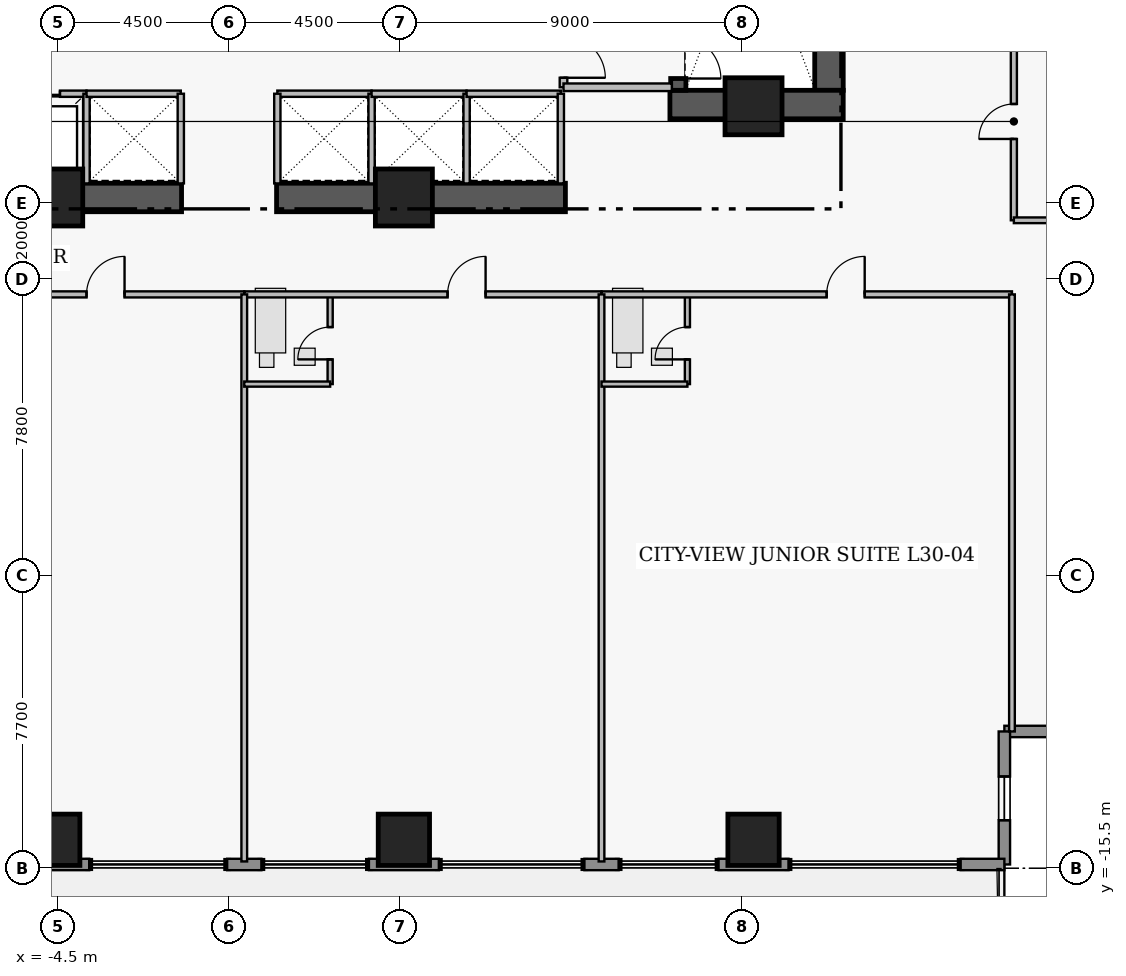
"""IFC4 building model, lengths in metres.
Left out: names, types, materials, properties, quantities, classifications, styles, units other than length and angle.
Written with IfcOpenShell. Run it as: python <this file> out.ifc"""

import sys

from ifc_helpers import new_model, si_unit, direction, frame, frame_2d, origin, origin_2d, place, context, subcontext, project, spatial, rectangle, extrude, element, fill, save


model = new_model("IFC4")
c1 = context("Model", 3, precision=1e-05, world=origin(), true_north=direction((0.0, 1.0)))
c2 = subcontext(c1, "Body", "Model", "MODEL_VIEW")
j1 = project(units=[si_unit("LENGTHUNIT", "METRE"), si_unit("PLANEANGLEUNIT", "RADIAN")], contexts=[c1])
p1 = place(None, origin())
s1 = spatial("IfcSite", under=j1, at=p1, CompositionType="ELEMENT")
p2 = place(p1, origin())
s2 = spatial("IfcBuilding", under=s1, at=p2, CompositionType="ELEMENT")
p3 = place(p2, frame((0.0, 0.0, 121.2)))
s3 = spatial("IfcBuildingStorey", under=s2, at=p3, CompositionType="ELEMENT", Elevation=121.2)
p4 = place(p3, frame((15.785, 4.97, 0.0), z_axis=(0.0, 0.0, 1.0), x_axis=(0.0, 1.0, 0.0)))
e1 = element("IfcWall", 1, at=p4, inside=s3, PredefinedType="SHEAR", context=c2, shape_type="SweptSolid", body=[
    extrude(rectangle(XDim=8.96, YDim=0.75, at=frame_2d((4.48, 0.0))), origin(), (0.0, 0.0, 1.0), 3.46),
])
p5 = place(p3, frame((11.6, 4.595, 0.0), z_axis=(0.0, 0.0, 1.0), x_axis=(1.0, 0.0, 0.0)))
e2 = element("IfcWall", 2, at=p5, inside=s3, PredefinedType="SHEAR", context=c2, shape_type="SweptSolid", body=[
    extrude(rectangle(XDim=4.56, YDim=0.75, at=frame_2d((2.28, 0.0))), origin(), (0.0, 0.0, 1.0), 3.46),
])
for number, where, z_axis, x_axis in (
    (3, (-8.85, 2.15, 0.0), (0.0, 0.0, 1.0), (1.0, 0.0, 0.0)),
    (4, (1.25, 2.15, 0.0), (0.0, 0.0, 1.0), (1.0, 0.0, 0.0)),
):
    element("IfcWall", number, at=place(p3, frame(where, z_axis=z_axis, x_axis=x_axis)), inside=s3, PredefinedType="SHEAR", context=c2, shape_type="SweptSolid", body=[
        extrude(rectangle(XDim=7.6, YDim=0.75, at=frame_2d((3.8, 0.0))), origin(), (0.0, 0.0, 1.0), 3.43),
    ])
p6 = place(p3, frame((11.82, 13.93, 0.0), z_axis=(0.0, 0.0, 1.0), x_axis=(0.0, -1.0, 0.0)))
e5 = element("IfcWall", 5, at=p6, inside=s3, PredefinedType="SHEAR", context=c2, shape_type="SweptSolid", body=[
    extrude(rectangle(XDim=8.96, YDim=0.4, at=frame_2d((4.48, 0.0))), origin(), (0.0, 0.0, 1.0), 3.46),
])
p7 = place(p6, frame((7.53, 0.0, 0.0)))
e6 = element("IfcOpeningElement", 6, at=p7, cuts=e5, PredefinedType="OPENING", context=c2, shape_type="SweptSolid", body=[
    extrude(rectangle(XDim=1.12, YDim=2.22, at=frame_2d((0.56, 1.11))), frame((0.0, 0.21, 0.0), z_axis=(0.0, -1.0, 0.0), x_axis=(1.0, 0.0, 0.0)), (0.0, 0.0, 1.0), 0.42),
])
for number, where, z_axis, x_axis in (
    (7, (-4.6, 2.15, 0.0), (0.0, 0.0, 1.0), (1.0, 0.0, 0.0)),
    (8, (4.6, 2.15, 0.0), (0.0, 0.0, 1.0), (1.0, 0.0, 0.0)),
    (9, (13.8, 4.55, 0.0), (0.0, 0.0, 1.0), (1.0, 0.0, 0.0)),
):
    element("IfcColumn", number, at=place(p3, frame(where, z_axis=z_axis, x_axis=x_axis)), inside=s3, PredefinedType="COLUMN", context=c2, shape_type="SweptSolid", body=[
        extrude(rectangle(XDim=1.5, YDim=1.5, at=origin_2d()), origin(), (0.0, 0.0, 1.0), 3.65),
    ])
for number, where, z_axis, x_axis in (
    (10, (-4.6, -14.75, 0.0), (0.0, 0.0, 1.0), (1.0, 0.0, 0.0)),
    (11, (4.6, -14.75, 0.0), (0.0, 0.0, 1.0), (1.0, 0.0, 0.0)),
    (12, (13.8, -14.75, 0.0), (0.0, 0.0, 1.0), (1.0, 0.0, 0.0)),
):
    element("IfcColumn", number, at=place(p3, frame(where, z_axis=z_axis, x_axis=x_axis)), inside=s3, PredefinedType="COLUMN", context=c2, shape_type="SweptSolid", body=[
        extrude(rectangle(XDim=1.35, YDim=1.35, at=origin_2d()), origin(), (0.0, 0.0, 1.0), 3.65),
    ])
p8 = place(p3, frame((23.9, -11.9, 0.0), z_axis=(0.0, 0.0, 1.0), x_axis=(-1.0, 0.0, 0.0)))
e13 = element("IfcWall", 13, at=p8, inside=s3, PredefinedType="STANDARD", context=c2, shape_type="SweptSolid", body=[
    extrude(rectangle(XDim=3.5, YDim=0.3, at=frame_2d((1.75, 0.0))), origin(), (0.0, 0.0, 1.0), 3.43),
])
p9 = place(p8, frame((1.065, 0.0, 1.25)))
e14 = element("IfcOpeningElement", 14, at=p9, cuts=e13, PredefinedType="OPENING", context=c2, shape_type="SweptSolid", body=[
    extrude(rectangle(XDim=1.15, YDim=1.55, at=frame_2d((0.575, 0.775))), frame((0.0, 0.16, 0.0), z_axis=(0.0, -1.0, 0.0), x_axis=(1.0, 0.0, 0.0)), (0.0, 0.0, 1.0), 0.32),
])
p10 = place(p3, frame((20.4, -11.9, 0.0), z_axis=(0.0, 0.0, 1.0), x_axis=(0.0, -1.0, 0.0)))
e15 = element("IfcWall", 15, at=p10, inside=s3, PredefinedType="STANDARD", context=c2, shape_type="SweptSolid", body=[
    extrude(rectangle(XDim=3.5, YDim=0.3, at=frame_2d((1.75, 0.0))), origin(), (0.0, 0.0, 1.0), 3.43),
])
p11 = place(p10, frame((1.185, 0.0, 1.25)))
e16 = element("IfcOpeningElement", 16, at=p11, cuts=e15, PredefinedType="OPENING", context=c2, shape_type="SweptSolid", body=[
    extrude(rectangle(XDim=1.15, YDim=1.55, at=frame_2d((0.575, 0.775))), frame((0.0, 0.16, 0.0), z_axis=(0.0, -1.0, 0.0), x_axis=(1.0, 0.0, 0.0)), (0.0, 0.0, 1.0), 0.32),
])
p12 = place(p3, frame((20.4, -15.4, 0.0), z_axis=(0.0, 0.0, 1.0), x_axis=(-1.0, 0.0, 0.0)))
e17 = element("IfcWall", 17, at=p12, inside=s3, PredefinedType="STANDARD", context=c2, shape_type="SweptSolid", body=[
    extrude(rectangle(XDim=1.15, YDim=0.3, at=frame_2d((0.575, 0.0))), origin(), (0.0, 0.0, 1.0), 3.43),
])
p13 = place(p3, frame((14.72, -15.4, 0.0), z_axis=(0.0, 0.0, 1.0), x_axis=(-1.0, 0.0, 0.0)))
e18 = element("IfcWall", 18, at=p13, inside=s3, PredefinedType="STANDARD", context=c2, shape_type="SweptSolid", body=[
    extrude(rectangle(XDim=1.84, YDim=0.3, at=frame_2d((0.92, 0.0))), origin(), (0.0, 0.0, 1.0), 3.43),
])
p14 = place(p3, frame((10.25, -15.4, 0.0), z_axis=(0.0, 0.0, 1.0), x_axis=(-1.0, 0.0, 0.0)))
e19 = element("IfcWall", 19, at=p14, inside=s3, PredefinedType="STANDARD", context=c2, shape_type="SweptSolid", body=[
    extrude(rectangle(XDim=0.9, YDim=0.3, at=frame_2d((0.45, 0.0))), origin(), (0.0, 0.0, 1.0), 3.43),
])
p15 = place(p3, frame((5.52, -15.4, 0.0), z_axis=(0.0, 0.0, 1.0), x_axis=(-1.0, 0.0, 0.0)))
e20 = element("IfcWall", 20, at=p15, inside=s3, PredefinedType="STANDARD", context=c2, shape_type="SweptSolid", body=[
    extrude(rectangle(XDim=1.84, YDim=0.3, at=frame_2d((0.92, 0.0))), origin(), (0.0, 0.0, 1.0), 3.43),
])
p16 = place(p3, frame((0.85, -15.4, 0.0), z_axis=(0.0, 0.0, 1.0), x_axis=(-1.0, 0.0, 0.0)))
e21 = element("IfcWall", 21, at=p16, inside=s3, PredefinedType="STANDARD", context=c2, shape_type="SweptSolid", body=[
    extrude(rectangle(XDim=0.9, YDim=0.3, at=frame_2d((0.45, 0.0))), origin(), (0.0, 0.0, 1.0), 3.43),
])
p17 = place(p3, frame((-3.68, -15.4, 0.0), z_axis=(0.0, 0.0, 1.0), x_axis=(-1.0, 0.0, 0.0)))
e22 = element("IfcWall", 22, at=p17, inside=s3, PredefinedType="STANDARD", context=c2, shape_type="SweptSolid", body=[
    extrude(rectangle(XDim=1.84, YDim=0.3, at=frame_2d((0.92, 0.0))), origin(), (0.0, 0.0, 1.0), 3.43),
])
p18 = place(p3, frame((8.8, 11.15, 0.0), z_axis=(0.0, 0.0, 1.0), x_axis=(0.0, -1.0, 0.0)))
e23 = element("IfcWall", 23, at=p18, inside=s3, PredefinedType="PARTITIONING", context=c2, shape_type="SweptSolid", body=[
    extrude(rectangle(XDim=6.1, YDim=0.2, at=frame_2d((3.05, 0.0))), origin(), (0.0, 0.0, 1.0), 3.43),
])
p19 = place(p18, frame((1.15, 0.0, 0.0)))
e24 = element("IfcOpeningElement", 24, at=p19, cuts=e23, PredefinedType="OPENING", context=c2, shape_type="SweptSolid", body=[
    extrude(rectangle(XDim=1.1, YDim=2.2, at=frame_2d((0.55, 1.1))), frame((0.0, 0.11, 0.0), z_axis=(0.0, -1.0, 0.0), x_axis=(1.0, 0.0, 0.0)), (0.0, 0.0, 1.0), 0.22),
])
p20 = place(p18, frame((4.75, 0.0, 0.0)))
e25 = element("IfcOpeningElement", 25, at=p20, cuts=e23, PredefinedType="OPENING", context=c2, shape_type="SweptSolid", body=[
    extrude(rectangle(XDim=1.1, YDim=2.2, at=frame_2d((0.55, 1.1))), frame((0.0, 0.11, 0.0), z_axis=(0.0, -1.0, 0.0), x_axis=(1.0, 0.0, 0.0)), (0.0, 0.0, 1.0), 0.22),
])
p21 = place(p3, frame((-6.25, 4.88, 0.0), z_axis=(0.0, 0.0, 1.0), x_axis=(1.0, 0.0, 0.0)))
e26 = element("IfcWall", 26, at=p21, inside=s3, PredefinedType="PARTITIONING", context=c2, shape_type="SweptSolid", body=[
    extrude(rectangle(XDim=2.5, YDim=0.165, at=frame_2d((1.25, 0.0))), origin(), (0.0, 0.0, 1.0), 3.43),
])
p22 = place(p21, frame((0.7, 0.0, 0.0)))
e27 = element("IfcOpeningElement", 27, at=p22, cuts=e26, PredefinedType="OPENING", context=c2, shape_type="SweptSolid", body=[
    extrude(rectangle(XDim=1.1, YDim=2.25, at=frame_2d((0.55, 1.125))), frame((0.0, 0.093, 0.0), z_axis=(0.0, -1.0, 0.0), x_axis=(1.0, 0.0, 0.0)), (0.0, 0.0, 1.0), 0.185),
])
p23 = place(p3, frame((-9.2, -0.4, 0.0), z_axis=(0.0, 0.0, 1.0), x_axis=(1.0, 0.0, 0.0)))
e28 = element("IfcWall", 28, at=p23, inside=s3, PredefinedType="PARTITIONING", context=c2, shape_type="SweptSolid", body=[
    extrude(rectangle(XDim=9.6, YDim=0.16, at=frame_2d((4.8, 0.0))), origin(), (0.0, 0.0, 1.0), 3.43),
])
p24 = place(p23, frame((5.45, 0.0, 0.0)))
e29 = element("IfcOpeningElement", 29, at=p24, cuts=e28, PredefinedType="OPENING", context=c2, shape_type="SweptSolid", body=[
    extrude(rectangle(XDim=1.0, YDim=2.15, at=frame_2d((0.5, 1.075))), frame((0.0, 0.09, 0.0), z_axis=(0.0, -1.0, 0.0), x_axis=(1.0, 0.0, 0.0)), (0.0, 0.0, 1.0), 0.18),
])
p25 = place(p3, frame((2.66, -2.76, 0.0), z_axis=(0.0, 0.0, 1.0), x_axis=(0.0, 1.0, 0.0)))
e30 = element("IfcWall", 30, at=p25, inside=s3, PredefinedType="PLUMBINGWALL", context=c2, shape_type="SweptSolid", body=[
    extrude(rectangle(XDim=2.36, YDim=0.135, at=frame_2d((1.18, 0.0))), origin(), (0.0, 0.0, 1.0), 3.43),
])
p26 = place(p25, frame((0.65, 0.0, 0.0)))
e31 = element("IfcOpeningElement", 31, at=p26, cuts=e30, PredefinedType="OPENING", context=c2, shape_type="SweptSolid", body=[
    extrude(rectangle(XDim=0.85, YDim=2.1, at=frame_2d((0.425, 1.05))), frame((0.0, 0.077, 0.0), z_axis=(0.0, -1.0, 0.0), x_axis=(1.0, 0.0, 0.0)), (0.0, 0.0, 1.0), 0.155),
])
p27 = place(p3, frame((0.4, -0.4, 0.0), z_axis=(0.0, 0.0, 1.0), x_axis=(1.0, 0.0, 0.0)))
e32 = element("IfcWall", 32, at=p27, inside=s3, PredefinedType="PARTITIONING", context=c2, shape_type="SweptSolid", body=[
    extrude(rectangle(XDim=9.4, YDim=0.16, at=frame_2d((4.7, 0.0))), origin(), (0.0, 0.0, 1.0), 3.43),
])
p28 = place(p27, frame((5.35, 0.0, 0.0)))
e33 = element("IfcOpeningElement", 33, at=p28, cuts=e32, PredefinedType="OPENING", context=c2, shape_type="SweptSolid", body=[
    extrude(rectangle(XDim=1.0, YDim=2.15, at=frame_2d((0.5, 1.075))), frame((0.0, 0.09, 0.0), z_axis=(0.0, -1.0, 0.0), x_axis=(1.0, 0.0, 0.0)), (0.0, 0.0, 1.0), 0.18),
])
p29 = place(p3, frame((12.06, -2.76, 0.0), z_axis=(0.0, 0.0, 1.0), x_axis=(0.0, 1.0, 0.0)))
e34 = element("IfcWall", 34, at=p29, inside=s3, PredefinedType="PLUMBINGWALL", context=c2, shape_type="SweptSolid", body=[
    extrude(rectangle(XDim=2.36, YDim=0.135, at=frame_2d((1.18, 0.0))), origin(), (0.0, 0.0, 1.0), 3.43),
])
p30 = place(p29, frame((0.65, 0.0, 0.0)))
e35 = element("IfcOpeningElement", 35, at=p30, cuts=e34, PredefinedType="OPENING", context=c2, shape_type="SweptSolid", body=[
    extrude(rectangle(XDim=0.85, YDim=2.1, at=frame_2d((0.425, 1.05))), frame((0.0, 0.077, 0.0), z_axis=(0.0, -1.0, 0.0), x_axis=(1.0, 0.0, 0.0)), (0.0, 0.0, 1.0), 0.155),
])
p31 = place(p3, frame((9.8, -0.4, 0.0), z_axis=(0.0, 0.0, 1.0), x_axis=(1.0, 0.0, 0.0)))
e36 = element("IfcWall", 36, at=p31, inside=s3, PredefinedType="PARTITIONING", context=c2, shape_type="SweptSolid", body=[
    extrude(rectangle(XDim=10.8, YDim=0.16, at=frame_2d((5.4, 0.0))), origin(), (0.0, 0.0, 1.0), 3.43),
])
p32 = place(p31, frame((5.925, 0.0, 0.0)))
e37 = element("IfcOpeningElement", 37, at=p32, cuts=e36, PredefinedType="OPENING", context=c2, shape_type="SweptSolid", body=[
    extrude(rectangle(XDim=1.0, YDim=2.15, at=frame_2d((0.5, 1.075))), frame((0.0, 0.09, 0.0), z_axis=(0.0, -1.0, 0.0), x_axis=(1.0, 0.0, 0.0)), (0.0, 0.0, 1.0), 0.18),
])
p33 = place(p3, frame((20.65, 1.55, 0.0), z_axis=(0.0, 0.0, 1.0), x_axis=(0.0, 1.0, 0.0)))
e38 = element("IfcWall", 38, at=p33, inside=s3, PredefinedType="PARTITIONING", context=c2, shape_type="SweptSolid", body=[
    extrude(rectangle(XDim=5.2, YDim=0.16, at=frame_2d((2.6, 0.0))), origin(), (0.0, 0.0, 1.0), 3.43),
])
p34 = place(p33, frame((2.14, 0.0, 0.0)))
e39 = element("IfcOpeningElement", 39, at=p34, cuts=e38, PredefinedType="OPENING", context=c2, shape_type="SweptSolid", body=[
    extrude(rectangle(XDim=0.92, YDim=2.12, at=frame_2d((0.46, 1.06))), frame((0.0, 0.09, 0.0), z_axis=(0.0, -1.0, 0.0), x_axis=(1.0, 0.0, 0.0)), (0.0, 0.0, 1.0), 0.18),
])
p35 = place(p3, frame((8.8, 5.05, 0.0), z_axis=(0.0, 0.0, 1.0), x_axis=(1.0, 0.0, 0.0)))
e40 = element("IfcWall", 40, at=p35, inside=s3, PredefinedType="PARTITIONING", context=c2, shape_type="SweptSolid", body=[
    extrude(rectangle(XDim=2.85, YDim=0.2, at=frame_2d((1.425, 0.0))), origin(), (0.0, 0.0, 1.0), 3.43),
])
p36 = place(p3, frame((-3.75, 2.52, 0.0), z_axis=(0.0, 0.0, 1.0), x_axis=(0.0, 1.0, 0.0)))
e41 = element("IfcWall", 41, at=p36, inside=s3, PredefinedType="PARTITIONING", context=c2, shape_type="SweptSolid", body=[
    extrude(rectangle(XDim=2.36, YDim=0.165, at=frame_2d((1.18, 0.0))), origin(), (0.0, 0.0, 1.0), 3.43),
])
p37 = place(p3, frame((-3.75, 4.88, 0.0), z_axis=(0.0, 0.0, 1.0), x_axis=(1.0, 0.0, 0.0)))
e42 = element("IfcWall", 42, at=p37, inside=s3, PredefinedType="PARTITIONING", context=c2, shape_type="SweptSolid", body=[
    extrude(rectangle(XDim=2.48, YDim=0.165, at=frame_2d((1.24, 0.0))), origin(), (0.0, 0.0, 1.0), 3.43),
])
p38 = place(p3, frame((-1.27, 2.52, 0.0), z_axis=(0.0, 0.0, 1.0), x_axis=(0.0, 1.0, 0.0)))
e43 = element("IfcWall", 43, at=p38, inside=s3, PredefinedType="PARTITIONING", context=c2, shape_type="SweptSolid", body=[
    extrude(rectangle(XDim=2.36, YDim=0.165, at=frame_2d((1.18, 0.0))), origin(), (0.0, 0.0, 1.0), 3.43),
])
p39 = place(p3, frame((1.27, 4.88, 0.0), z_axis=(0.0, 0.0, 1.0), x_axis=(1.0, 0.0, 0.0)))
e44 = element("IfcWall", 44, at=p39, inside=s3, PredefinedType="PARTITIONING", context=c2, shape_type="SweptSolid", body=[
    extrude(rectangle(XDim=2.48, YDim=0.165, at=frame_2d((1.24, 0.0))), origin(), (0.0, 0.0, 1.0), 3.43),
])
for number, where, z_axis, x_axis in (
    (45, (1.27, 2.52, 0.0), (0.0, 0.0, 1.0), (0.0, 1.0, 0.0)),
    (46, (3.75, 2.52, 0.0), (0.0, 0.0, 1.0), (0.0, 1.0, 0.0)),
):
    element("IfcWall", number, at=place(p3, frame(where, z_axis=z_axis, x_axis=x_axis)), inside=s3, PredefinedType="PARTITIONING", context=c2, shape_type="SweptSolid", body=[
        extrude(rectangle(XDim=2.36, YDim=0.165, at=frame_2d((1.18, 0.0))), origin(), (0.0, 0.0, 1.0), 3.43),
    ])
p40 = place(p3, frame((3.75, 4.88, 0.0), z_axis=(0.0, 0.0, 1.0), x_axis=(1.0, 0.0, 0.0)))
e47 = element("IfcWall", 47, at=p40, inside=s3, PredefinedType="PARTITIONING", context=c2, shape_type="SweptSolid", body=[
    extrude(rectangle(XDim=2.5, YDim=0.165, at=frame_2d((1.25, 0.0))), origin(), (0.0, 0.0, 1.0), 3.43),
])
p41 = place(p3, frame((6.25, 2.52, 0.0), z_axis=(0.0, 0.0, 1.0), x_axis=(0.0, 1.0, 0.0)))
e48 = element("IfcWall", 48, at=p41, inside=s3, PredefinedType="PARTITIONING", context=c2, shape_type="SweptSolid", body=[
    extrude(rectangle(XDim=2.36, YDim=0.165, at=frame_2d((1.18, 0.0))), origin(), (0.0, 0.0, 1.0), 3.43),
])
p42 = place(p3, frame((6.25, 4.88, 0.0), z_axis=(0.0, 0.0, 1.0), x_axis=(1.0, 0.0, 0.0)))
e49 = element("IfcWall", 49, at=p42, inside=s3, PredefinedType="PARTITIONING", context=c2, shape_type="SweptSolid", body=[
    extrude(rectangle(XDim=2.48, YDim=0.165, at=frame_2d((1.24, 0.0))), origin(), (0.0, 0.0, 1.0), 3.43),
])
p43 = place(p3, frame((8.73, 2.52, 0.0), z_axis=(0.0, 0.0, 1.0), x_axis=(0.0, 1.0, 0.0)))
e50 = element("IfcWall", 50, at=p43, inside=s3, PredefinedType="PARTITIONING", context=c2, shape_type="SweptSolid", body=[
    extrude(rectangle(XDim=2.36, YDim=0.165, at=frame_2d((1.18, 0.0))), origin(), (0.0, 0.0, 1.0), 3.43),
])
p44 = place(p3, frame((0.4, -15.32, 0.0), z_axis=(0.0, 0.0, 1.0), x_axis=(0.0, 1.0, 0.0)))
e51 = element("IfcWall", 51, at=p44, inside=s3, PredefinedType="PARTITIONING", context=c2, shape_type="SweptSolid", body=[
    extrude(rectangle(XDim=14.92, YDim=0.15, at=frame_2d((7.46, 0.0))), origin(), (0.0, 0.0, 1.0), 3.43),
])
p45 = place(p3, frame((0.4, -2.76, 0.0), z_axis=(0.0, 0.0, 1.0), x_axis=(1.0, 0.0, 0.0)))
e52 = element("IfcWall", 52, at=p45, inside=s3, PredefinedType="PLUMBINGWALL", context=c2, shape_type="SweptSolid", body=[
    extrude(rectangle(XDim=2.26, YDim=0.135, at=frame_2d((1.13, 0.0))), origin(), (0.0, 0.0, 1.0), 3.43),
])
p46 = place(p3, frame((9.8, -15.32, 0.0), z_axis=(0.0, 0.0, 1.0), x_axis=(0.0, 1.0, 0.0)))
e53 = element("IfcWall", 53, at=p46, inside=s3, PredefinedType="PARTITIONING", context=c2, shape_type="SweptSolid", body=[
    extrude(rectangle(XDim=14.92, YDim=0.15, at=frame_2d((7.46, 0.0))), origin(), (0.0, 0.0, 1.0), 3.43),
])
p47 = place(p3, frame((9.8, -2.76, 0.0), z_axis=(0.0, 0.0, 1.0), x_axis=(1.0, 0.0, 0.0)))
e54 = element("IfcWall", 54, at=p47, inside=s3, PredefinedType="PLUMBINGWALL", context=c2, shape_type="SweptSolid", body=[
    extrude(rectangle(XDim=2.26, YDim=0.135, at=frame_2d((1.13, 0.0))), origin(), (0.0, 0.0, 1.0), 3.43),
])
p48 = place(p3, frame((20.6, -11.9, 0.0), z_axis=(0.0, 0.0, 1.0), x_axis=(0.0, 1.0, 0.0)))
e55 = element("IfcWall", 55, at=p48, inside=s3, PredefinedType="PARTITIONING", context=c2, shape_type="SweptSolid", body=[
    extrude(rectangle(XDim=11.5, YDim=0.15, at=frame_2d((5.75, 0.0))), origin(), (0.0, 0.0, 1.0), 3.43),
])
p49 = place(p3, frame((20.65, 1.55, 0.0), z_axis=(0.0, 0.0, 1.0), x_axis=(1.0, 0.0, 0.0)))
e56 = element("IfcWall", 56, at=p49, inside=s3, PredefinedType="PARTITIONING", context=c2, shape_type="SweptSolid", body=[
    extrude(rectangle(XDim=3.217, YDim=0.15, at=frame_2d((1.608, 0.0))), origin(), (0.0, 0.0, 1.0), 3.43),
])
p50 = place(p11, origin())
e57 = element("IfcWindow", 57, at=p50, inside=s3, PartitioningType="SINGLE_PANEL", PredefinedType="WINDOW", context=c2, shape_type="SweptSolid", body=[
    extrude(rectangle(XDim=1.15, YDim=1.55, at=frame_2d((0.575, 0.775))), frame((0.0, 0.03, 0.0), z_axis=(0.0, -1.0, 0.0), x_axis=(1.0, 0.0, 0.0)), (0.0, 0.0, 1.0), 0.06),
])
fill(e16, e57)
p51 = place(p7, origin())
e58 = element("IfcDoor", 58, at=p51, inside=s3, OperationType="SINGLE_SWING_RIGHT", PredefinedType="DOOR", context=c2, shape_type="SweptSolid", body=[
    extrude(rectangle(XDim=1.12, YDim=2.22, at=frame_2d((0.56, 1.11))), frame((0.0, 0.025, 0.0), z_axis=(0.0, -1.0, 0.0), x_axis=(1.0, 0.0, 0.0)), (0.0, 0.0, 1.0), 0.05),
])
fill(e6, e58)
p52 = place(p20, origin())
e59 = element("IfcDoor", 59, at=p52, inside=s3, OperationType="SINGLE_SWING_RIGHT", PredefinedType="DOOR", context=c2, shape_type="SweptSolid", body=[
    extrude(rectangle(XDim=1.1, YDim=2.2, at=frame_2d((0.55, 1.1))), frame((0.0, 0.025, 0.0), z_axis=(0.0, -1.0, 0.0), x_axis=(1.0, 0.0, 0.0)), (0.0, 0.0, 1.0), 0.05),
])
fill(e25, e59)
p53 = place(p22, origin())
e60 = element("IfcDoor", 60, at=p53, inside=s3, OperationType="SLIDING_TO_LEFT", PredefinedType="DOOR", context=c2, shape_type="SweptSolid", body=[
    extrude(rectangle(XDim=1.1, YDim=2.25, at=frame_2d((0.55, 1.125))), frame((0.0, 0.025, 0.0), z_axis=(0.0, -1.0, 0.0), x_axis=(1.0, 0.0, 0.0)), (0.0, 0.0, 1.0), 0.05),
])
fill(e27, e60)
p54 = place(p24, origin())
e61 = element("IfcDoor", 61, at=p54, inside=s3, OperationType="SINGLE_SWING_RIGHT", PredefinedType="DOOR", context=c2, shape_type="SweptSolid", body=[
    extrude(rectangle(XDim=1.0, YDim=2.15, at=frame_2d((0.5, 1.075))), frame((0.0, 0.025, 0.0), z_axis=(0.0, -1.0, 0.0), x_axis=(1.0, 0.0, 0.0)), (0.0, 0.0, 1.0), 0.05),
])
fill(e29, e61)
p55 = place(p26, origin())
e62 = element("IfcDoor", 62, at=p55, inside=s3, OperationType="SINGLE_SWING_LEFT", PredefinedType="DOOR", context=c2, shape_type="SweptSolid", body=[
    extrude(rectangle(XDim=0.85, YDim=2.1, at=frame_2d((0.425, 1.05))), frame((0.0, 0.025, 0.0), z_axis=(0.0, -1.0, 0.0), x_axis=(1.0, 0.0, 0.0)), (0.0, 0.0, 1.0), 0.05),
])
fill(e31, e62)
p56 = place(p28, origin())
e63 = element("IfcDoor", 63, at=p56, inside=s3, OperationType="SINGLE_SWING_RIGHT", PredefinedType="DOOR", context=c2, shape_type="SweptSolid", body=[
    extrude(rectangle(XDim=1.0, YDim=2.15, at=frame_2d((0.5, 1.075))), frame((0.0, 0.025, 0.0), z_axis=(0.0, -1.0, 0.0), x_axis=(1.0, 0.0, 0.0)), (0.0, 0.0, 1.0), 0.05),
])
fill(e33, e63)
p57 = place(p30, origin())
e64 = element("IfcDoor", 64, at=p57, inside=s3, OperationType="SINGLE_SWING_LEFT", PredefinedType="DOOR", context=c2, shape_type="SweptSolid", body=[
    extrude(rectangle(XDim=0.85, YDim=2.1, at=frame_2d((0.425, 1.05))), frame((0.0, 0.025, 0.0), z_axis=(0.0, -1.0, 0.0), x_axis=(1.0, 0.0, 0.0)), (0.0, 0.0, 1.0), 0.05),
])
fill(e35, e64)
p58 = place(p32, origin())
e65 = element("IfcDoor", 65, at=p58, inside=s3, OperationType="SINGLE_SWING_RIGHT", PredefinedType="DOOR", context=c2, shape_type="SweptSolid", body=[
    extrude(rectangle(XDim=1.0, YDim=2.15, at=frame_2d((0.5, 1.075))), frame((0.0, 0.025, 0.0), z_axis=(0.0, -1.0, 0.0), x_axis=(1.0, 0.0, 0.0)), (0.0, 0.0, 1.0), 0.05),
])
fill(e37, e65)
p59 = place(p34, origin())
e66 = element("IfcDoor", 66, at=p59, inside=s3, OperationType="SINGLE_SWING_LEFT", PredefinedType="DOOR", context=c2, shape_type="SweptSolid", body=[
    extrude(rectangle(XDim=0.92, YDim=2.12, at=frame_2d((0.46, 1.06))), frame((0.0, 0.025, 0.0), z_axis=(0.0, -1.0, 0.0), x_axis=(1.0, 0.0, 0.0)), (0.0, 0.0, 1.0), 0.05),
])
fill(e39, e66)
save(model, sys.argv[1])
